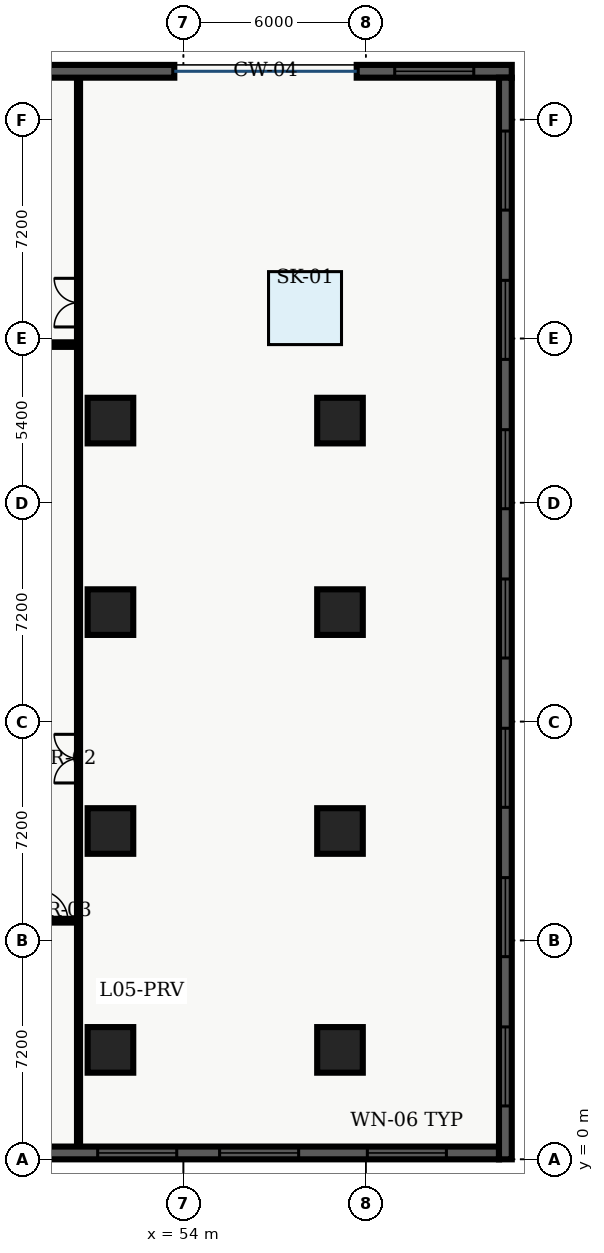
"""IFC4 building model, lengths in metres.
Left out: names, types, materials, properties, quantities, classifications, styles, units other than length and angle.
Written with IfcOpenShell. Run it as: python <this file> out.ifc"""

import sys

from ifc_helpers import new_model, entity, si_unit, converted_unit, direction, frame, origin_with_axes, origin_2d_with_axis, place, context, subcontext, project, spatial, polyline, rectangle, outline, extrude, element, fill, save


model = new_model("IFC4")
c1 = context("Model", 3, precision=1e-05, world=origin_with_axes(), true_north=direction((0.0, 1.0)))
c2 = subcontext(c1, "Body", "Model", "MODEL_VIEW")
j1 = project(units=[si_unit("LENGTHUNIT", "METRE"), converted_unit("PLANEANGLEUNIT", "DEGREE", entity("IfcPlaneAngleMeasure", 0.017), si_unit("PLANEANGLEUNIT", "RADIAN"), dimensions=[0, 0, 0, 0, 0, 0, 0])], contexts=[c1])
p1 = place(None, origin_with_axes())
s1 = spatial("IfcSite", under=j1, at=p1, CompositionType="ELEMENT")
p2 = place(p1, origin_with_axes())
s2 = spatial("IfcBuilding", under=s1, at=p2, CompositionType="ELEMENT")
p3 = place(p2, frame((0.0, 0.0, 24.3), z_axis=(0.0, 0.0, 1.0), x_axis=(1.0, 0.0, 0.0)))
s3 = spatial("IfcBuildingStorey", under=s2, at=p3, CompositionType="ELEMENT", Elevation=24.3)
for number, where, z_axis, x_axis in (
    (1, (51.6, 3.6, 0.0), (0.0, 0.0, 1.0), (1.0, 0.0, 0.0)),
    (2, (51.6, 10.8, 0.0), (0.0, 0.0, 1.0), (1.0, 0.0, 0.0)),
    (3, (51.6, 18.0, 0.0), (0.0, 0.0, 1.0), (1.0, 0.0, 0.0)),
    (4, (51.6, 24.3, 0.0), (0.0, 0.0, 1.0), (1.0, 0.0, 0.0)),
    (5, (59.15, 3.6, 0.0), (0.0, 0.0, 1.0), (1.0, 0.0, 0.0)),
    (6, (59.15, 10.8, 0.0), (0.0, 0.0, 1.0), (1.0, 0.0, 0.0)),
    (7, (59.15, 18.0, 0.0), (0.0, 0.0, 1.0), (1.0, 0.0, 0.0)),
    (8, (59.15, 24.3, 0.0), (0.0, 0.0, 1.0), (1.0, 0.0, 0.0)),
):
    element("IfcColumn", number, at=place(p3, frame(where, z_axis=z_axis, x_axis=x_axis)), inside=s3, PredefinedType="COLUMN", context=c2, shape_type="SweptSolid", body=[
        extrude(rectangle(XDim=1.5, YDim=1.5, at=origin_2d_with_axis()), origin_with_axes(), (0.0, 0.0, 1.0), 4.5),
    ])
p4 = place(p3, frame((50.55, 0.38, 0.0), z_axis=(0.0, 0.0, 1.0), x_axis=(0.0, 1.0, 0.0)))
e9 = element("IfcWall", 9, at=p4, inside=s3, PredefinedType="PARTITIONING", context=c2, shape_type="SweptSolid", body=[
    extrude(outline(polyline([(0.0, -0.05), (35.24, -0.05), (35.24, 0.05), (0.0, 0.05), (0.0, -0.05)])), origin_with_axes(), (0.0, 0.0, 1.0), 3.2),
])
p5 = place(p4, frame((12.8, 0.0, 0.0), z_axis=(0.0, 0.0, 1.0), x_axis=(1.0, 0.0, 0.0)))
e10 = element("IfcOpeningElement", 10, at=p5, cuts=e9, PredefinedType="OPENING", context=c2, shape_type="SweptSolid", body=[
    extrude(rectangle(XDim=1.6, YDim=0.12, at=origin_2d_with_axis()), origin_with_axes(), (0.0, 0.0, 1.0), 2.2),
])
p6 = place(p4, frame((27.8, 0.0, 0.0), z_axis=(0.0, 0.0, 1.0), x_axis=(1.0, 0.0, 0.0)))
e11 = element("IfcOpeningElement", 11, at=p6, cuts=e9, PredefinedType="OPENING", context=c2, shape_type="SweptSolid", body=[
    extrude(rectangle(XDim=1.6, YDim=0.12, at=origin_2d_with_axis()), origin_with_axes(), (0.0, 0.0, 1.0), 2.2),
])
p7 = place(p3, frame((48.05, 7.85, 0.0), z_axis=(0.0, 0.0, 1.0), x_axis=(1.0, 0.0, 0.0)))
e12 = element("IfcWall", 12, at=p7, inside=s3, PredefinedType="PARTITIONING", context=c2, shape_type="SweptSolid", body=[
    extrude(outline(polyline([(0.0, -0.062), (2.5, -0.062), (2.5, 0.062), (0.0, 0.062), (0.0, -0.062)])), origin_with_axes(), (0.0, 0.0, 1.0), 3.2),
])
p8 = place(p7, frame((1.65, 0.0, 0.0), z_axis=(0.0, 0.0, 1.0), x_axis=(1.0, 0.0, 0.0)))
e13 = element("IfcOpeningElement", 13, at=p8, cuts=e12, PredefinedType="OPENING", context=c2, shape_type="SweptSolid", body=[
    extrude(rectangle(XDim=1.0, YDim=0.145, at=origin_2d_with_axis()), origin_with_axes(), (0.0, 0.0, 1.0), 2.15),
])
p9 = place(p3, frame((21.3, 26.8, 0.0), z_axis=(0.0, 0.0, 1.0), x_axis=(1.0, 0.0, 0.0)))
e14 = element("IfcWall", 14, at=p9, inside=s3, PredefinedType="PARTITIONING", context=c2, shape_type="SweptSolid", body=[
    extrude(outline(polyline([(0.0, -0.075), (29.25, -0.075), (29.25, 0.075), (0.0, 0.075), (0.0, -0.075)])), origin_with_axes(), (0.0, 0.0, 1.0), 3.2),
])
p10 = place(p3, frame((64.38, 0.21, 0.0), z_axis=(0.0, 0.0, 1.0), x_axis=(-1.0, 0.0, 0.0)))
e15 = element("IfcWall", 15, at=p10, inside=s3, PredefinedType="SOLIDWALL", context=c2, shape_type="SweptSolid", body=[
    extrude(outline(polyline([(0.0, -0.21), (64.38, -0.21), (64.38, 0.21), (0.0, 0.21), (0.0, -0.21)])), origin_with_axes(), (0.0, 0.0, 1.0), 4.2),
])
p11 = place(p10, frame((3.03, 0.0, 0.45), z_axis=(0.0, 0.0, 1.0), x_axis=(1.0, 0.0, 0.0)))
e16 = element("IfcOpeningElement", 16, at=p11, cuts=e15, PredefinedType="OPENING", context=c2, shape_type="SweptSolid", body=[
    extrude(rectangle(XDim=2.6, YDim=0.44, at=origin_2d_with_axis()), origin_with_axes(), (0.0, 0.0, 1.0), 2.8),
])
p12 = place(p10, frame((7.89, 0.0, 0.45), z_axis=(0.0, 0.0, 1.0), x_axis=(1.0, 0.0, 0.0)))
e17 = element("IfcOpeningElement", 17, at=p12, cuts=e15, PredefinedType="OPENING", context=c2, shape_type="SweptSolid", body=[
    extrude(rectangle(XDim=2.6, YDim=0.44, at=origin_2d_with_axis()), origin_with_axes(), (0.0, 0.0, 1.0), 2.8),
])
p13 = place(p10, frame((11.9, 0.0, 0.45), z_axis=(0.0, 0.0, 1.0), x_axis=(1.0, 0.0, 0.0)))
e18 = element("IfcOpeningElement", 18, at=p13, cuts=e15, PredefinedType="OPENING", context=c2, shape_type="SweptSolid", body=[
    extrude(rectangle(XDim=2.6, YDim=0.44, at=origin_2d_with_axis()), origin_with_axes(), (0.0, 0.0, 1.0), 2.8),
])
p14 = place(p10, frame((17.61, 0.0, 0.45), z_axis=(0.0, 0.0, 1.0), x_axis=(1.0, 0.0, 0.0)))
e19 = element("IfcOpeningElement", 19, at=p14, cuts=e15, PredefinedType="OPENING", context=c2, shape_type="SweptSolid", body=[
    extrude(rectangle(XDim=2.6, YDim=0.44, at=origin_2d_with_axis()), origin_with_axes(), (0.0, 0.0, 1.0), 2.8),
])
p15 = place(p10, frame((22.47, 0.0, 0.45), z_axis=(0.0, 0.0, 1.0), x_axis=(1.0, 0.0, 0.0)))
e20 = element("IfcOpeningElement", 20, at=p15, cuts=e15, PredefinedType="OPENING", context=c2, shape_type="SweptSolid", body=[
    extrude(rectangle(XDim=2.6, YDim=0.44, at=origin_2d_with_axis()), origin_with_axes(), (0.0, 0.0, 1.0), 2.8),
])
p16 = place(p10, frame((27.33, 0.0, 0.45), z_axis=(0.0, 0.0, 1.0), x_axis=(1.0, 0.0, 0.0)))
e21 = element("IfcOpeningElement", 21, at=p16, cuts=e15, PredefinedType="OPENING", context=c2, shape_type="SweptSolid", body=[
    extrude(rectangle(XDim=2.6, YDim=0.44, at=origin_2d_with_axis()), origin_with_axes(), (0.0, 0.0, 1.0), 2.8),
])
p17 = place(p10, frame((32.19, 0.0, 0.45), z_axis=(0.0, 0.0, 1.0), x_axis=(1.0, 0.0, 0.0)))
e22 = element("IfcOpeningElement", 22, at=p17, cuts=e15, PredefinedType="OPENING", context=c2, shape_type="SweptSolid", body=[
    extrude(rectangle(XDim=2.6, YDim=0.44, at=origin_2d_with_axis()), origin_with_axes(), (0.0, 0.0, 1.0), 2.8),
])
p18 = place(p10, frame((37.05, 0.0, 0.45), z_axis=(0.0, 0.0, 1.0), x_axis=(1.0, 0.0, 0.0)))
e23 = element("IfcOpeningElement", 23, at=p18, cuts=e15, PredefinedType="OPENING", context=c2, shape_type="SweptSolid", body=[
    extrude(rectangle(XDim=2.6, YDim=0.44, at=origin_2d_with_axis()), origin_with_axes(), (0.0, 0.0, 1.0), 2.8),
])
p19 = place(p10, frame((41.06, 0.0, 0.45), z_axis=(0.0, 0.0, 1.0), x_axis=(1.0, 0.0, 0.0)))
e24 = element("IfcOpeningElement", 24, at=p19, cuts=e15, PredefinedType="OPENING", context=c2, shape_type="SweptSolid", body=[
    extrude(rectangle(XDim=2.6, YDim=0.44, at=origin_2d_with_axis()), origin_with_axes(), (0.0, 0.0, 1.0), 2.8),
])
p20 = place(p10, frame((46.77, 0.0, 0.45), z_axis=(0.0, 0.0, 1.0), x_axis=(1.0, 0.0, 0.0)))
e25 = element("IfcOpeningElement", 25, at=p20, cuts=e15, PredefinedType="OPENING", context=c2, shape_type="SweptSolid", body=[
    extrude(rectangle(XDim=2.6, YDim=0.44, at=origin_2d_with_axis()), origin_with_axes(), (0.0, 0.0, 1.0), 2.8),
])
p21 = place(p10, frame((50.78, 0.0, 0.45), z_axis=(0.0, 0.0, 1.0), x_axis=(1.0, 0.0, 0.0)))
e26 = element("IfcOpeningElement", 26, at=p21, cuts=e15, PredefinedType="OPENING", context=c2, shape_type="SweptSolid", body=[
    extrude(rectangle(XDim=2.6, YDim=0.44, at=origin_2d_with_axis()), origin_with_axes(), (0.0, 0.0, 1.0), 2.8),
])
p22 = place(p10, frame((56.49, 0.0, 0.45), z_axis=(0.0, 0.0, 1.0), x_axis=(1.0, 0.0, 0.0)))
e27 = element("IfcOpeningElement", 27, at=p22, cuts=e15, PredefinedType="OPENING", context=c2, shape_type="SweptSolid", body=[
    extrude(rectangle(XDim=2.6, YDim=0.44, at=origin_2d_with_axis()), origin_with_axes(), (0.0, 0.0, 1.0), 2.8),
])
p23 = place(p10, frame((61.35, 0.0, 0.45), z_axis=(0.0, 0.0, 1.0), x_axis=(1.0, 0.0, 0.0)))
e28 = element("IfcOpeningElement", 28, at=p23, cuts=e15, PredefinedType="OPENING", context=c2, shape_type="SweptSolid", body=[
    extrude(rectangle(XDim=2.6, YDim=0.44, at=origin_2d_with_axis()), origin_with_axes(), (0.0, 0.0, 1.0), 2.8),
])
p24 = place(p3, frame((48.18, 35.79, 0.0), z_axis=(0.0, 0.0, 1.0), x_axis=(1.0, 0.0, 0.0)))
e29 = element("IfcWall", 29, at=p24, inside=s3, PredefinedType="SOLIDWALL", context=c2, shape_type="SweptSolid", body=[
    extrude(outline(polyline([(0.0, -0.21), (5.52, -0.21), (5.52, 0.21), (0.0, 0.21), (0.0, -0.21)])), origin_with_axes(), (0.0, 0.0, 1.0), 4.2),
])
p25 = place(p3, frame((59.7, 35.79, 0.0), z_axis=(0.0, 0.0, 1.0), x_axis=(1.0, 0.0, 0.0)))
e30 = element("IfcWall", 30, at=p25, inside=s3, PredefinedType="SOLIDWALL", context=c2, shape_type="SweptSolid", body=[
    extrude(outline(polyline([(0.0, -0.21), (5.1, -0.21), (5.1, 0.21), (0.0, 0.21), (0.0, -0.21)])), origin_with_axes(), (0.0, 0.0, 1.0), 4.2),
])
p26 = place(p25, frame((2.55, 0.0, 0.45), z_axis=(0.0, 0.0, 1.0), x_axis=(1.0, 0.0, 0.0)))
e31 = element("IfcOpeningElement", 31, at=p26, cuts=e30, PredefinedType="OPENING", context=c2, shape_type="SweptSolid", body=[
    extrude(rectangle(XDim=2.6, YDim=0.44, at=origin_2d_with_axis()), origin_with_axes(), (0.0, 0.0, 1.0), 2.8),
])
p27 = place(p3, frame((64.59, 35.58, 0.0), z_axis=(0.0, 0.0, 1.0), x_axis=(0.0, -1.0, 0.0)))
e32 = element("IfcWall", 32, at=p27, inside=s3, PredefinedType="SOLIDWALL", context=c2, shape_type="SweptSolid", body=[
    extrude(outline(polyline([(0.0, -0.21), (35.58, -0.21), (35.58, 0.21), (0.0, 0.21), (0.0, -0.21)])), origin_with_axes(), (0.0, 0.0, 1.0), 4.2),
])
p28 = place(p27, frame((3.056, 0.0, 0.45), z_axis=(0.0, 0.0, 1.0), x_axis=(1.0, 0.0, 0.0)))
e33 = element("IfcOpeningElement", 33, at=p28, cuts=e32, PredefinedType="OPENING", context=c2, shape_type="SweptSolid", body=[
    extrude(rectangle(XDim=2.6, YDim=0.44, at=origin_2d_with_axis()), origin_with_axes(), (0.0, 0.0, 1.0), 2.8),
])
p29 = place(p27, frame((7.967, 0.0, 0.45), z_axis=(0.0, 0.0, 1.0), x_axis=(1.0, 0.0, 0.0)))
e34 = element("IfcOpeningElement", 34, at=p29, cuts=e32, PredefinedType="OPENING", context=c2, shape_type="SweptSolid", body=[
    extrude(rectangle(XDim=2.6, YDim=0.44, at=origin_2d_with_axis()), origin_with_axes(), (0.0, 0.0, 1.0), 2.8),
])
p30 = place(p27, frame((12.879, 0.0, 0.45), z_axis=(0.0, 0.0, 1.0), x_axis=(1.0, 0.0, 0.0)))
e35 = element("IfcOpeningElement", 35, at=p30, cuts=e32, PredefinedType="OPENING", context=c2, shape_type="SweptSolid", body=[
    extrude(rectangle(XDim=2.6, YDim=0.44, at=origin_2d_with_axis()), origin_with_axes(), (0.0, 0.0, 1.0), 2.8),
])
p31 = place(p27, frame((17.79, 0.0, 0.45), z_axis=(0.0, 0.0, 1.0), x_axis=(1.0, 0.0, 0.0)))
e36 = element("IfcOpeningElement", 36, at=p31, cuts=e32, PredefinedType="OPENING", context=c2, shape_type="SweptSolid", body=[
    extrude(rectangle(XDim=2.6, YDim=0.44, at=origin_2d_with_axis()), origin_with_axes(), (0.0, 0.0, 1.0), 2.8),
])
p32 = place(p27, frame((22.701, 0.0, 0.45), z_axis=(0.0, 0.0, 1.0), x_axis=(1.0, 0.0, 0.0)))
e37 = element("IfcOpeningElement", 37, at=p32, cuts=e32, PredefinedType="OPENING", context=c2, shape_type="SweptSolid", body=[
    extrude(rectangle(XDim=2.6, YDim=0.44, at=origin_2d_with_axis()), origin_with_axes(), (0.0, 0.0, 1.0), 2.8),
])
p33 = place(p27, frame((27.613, 0.0, 0.45), z_axis=(0.0, 0.0, 1.0), x_axis=(1.0, 0.0, 0.0)))
e38 = element("IfcOpeningElement", 38, at=p33, cuts=e32, PredefinedType="OPENING", context=c2, shape_type="SweptSolid", body=[
    extrude(rectangle(XDim=2.6, YDim=0.44, at=origin_2d_with_axis()), origin_with_axes(), (0.0, 0.0, 1.0), 2.8),
])
p34 = place(p27, frame((32.524, 0.0, 0.45), z_axis=(0.0, 0.0, 1.0), x_axis=(1.0, 0.0, 0.0)))
e39 = element("IfcOpeningElement", 39, at=p34, cuts=e32, PredefinedType="OPENING", context=c2, shape_type="SweptSolid", body=[
    extrude(rectangle(XDim=2.6, YDim=0.44, at=origin_2d_with_axis()), origin_with_axes(), (0.0, 0.0, 1.0), 2.8),
])
p35 = place(p7, frame((1.65, 0.0, 0.0), z_axis=(0.0, 0.0, 1.0), x_axis=(1.0, 0.0, 0.0)))
e40 = element("IfcDoor", 40, at=p35, inside=s3, OperationType="SINGLE_SWING_LEFT", PredefinedType="DOOR", context=c2, shape_type="SweptSolid", body=[
    extrude(rectangle(XDim=1.0, YDim=0.075, at=origin_2d_with_axis()), origin_with_axes(), (0.0, 0.0, 1.0), 2.15),
])
fill(e13, e40)
p36 = place(p4, frame((12.8, 0.0, 0.0), z_axis=(0.0, 0.0, 1.0), x_axis=(1.0, 0.0, 0.0)))
e41 = element("IfcDoor", 41, at=p36, inside=s3, OperationType="DOUBLE_DOOR_SINGLE_SWING", PredefinedType="DOOR", context=c2, shape_type="SweptSolid", body=[
    extrude(rectangle(XDim=1.6, YDim=0.06, at=origin_2d_with_axis()), origin_with_axes(), (0.0, 0.0, 1.0), 2.2),
])
fill(e10, e41)
p37 = place(p4, frame((27.8, 0.0, 0.0), z_axis=(0.0, 0.0, 1.0), x_axis=(1.0, 0.0, 0.0)))
e42 = element("IfcDoor", 42, at=p37, inside=s3, OperationType="DOUBLE_DOOR_SINGLE_SWING", PredefinedType="DOOR", context=c2, shape_type="SweptSolid", body=[
    extrude(rectangle(XDim=1.6, YDim=0.06, at=origin_2d_with_axis()), origin_with_axes(), (0.0, 0.0, 1.0), 2.2),
])
fill(e11, e42)
p38 = place(p3, frame((58.0, 28.0, -0.05), z_axis=(0.0, 0.0, 1.0), x_axis=(1.0, 0.0, 0.0)))
e43 = element("IfcWindow", 43, at=p38, inside=s3, PredefinedType="SKYLIGHT", context=c2, shape_type="SweptSolid", body=[
    extrude(rectangle(XDim=2.4, YDim=2.4, at=origin_2d_with_axis()), origin_with_axes(), (0.0, 0.0, 1.0), 0.05),
])
p39 = place(p10, frame((3.03, 0.0, 0.45), z_axis=(0.0, 0.0, 1.0), x_axis=(1.0, 0.0, 0.0)))
e44 = element("IfcWindow", 44, at=p39, inside=s3, PredefinedType="WINDOW", context=c2, shape_type="SweptSolid", body=[
    extrude(rectangle(XDim=2.6, YDim=0.09, at=origin_2d_with_axis()), origin_with_axes(), (0.0, 0.0, 1.0), 2.8),
])
fill(e16, e44)
p40 = place(p10, frame((7.89, 0.0, 0.45), z_axis=(0.0, 0.0, 1.0), x_axis=(1.0, 0.0, 0.0)))
e45 = element("IfcWindow", 45, at=p40, inside=s3, PredefinedType="WINDOW", context=c2, shape_type="SweptSolid", body=[
    extrude(rectangle(XDim=2.6, YDim=0.09, at=origin_2d_with_axis()), origin_with_axes(), (0.0, 0.0, 1.0), 2.8),
])
fill(e17, e45)
p41 = place(p10, frame((11.9, 0.0, 0.45), z_axis=(0.0, 0.0, 1.0), x_axis=(1.0, 0.0, 0.0)))
e46 = element("IfcWindow", 46, at=p41, inside=s3, PredefinedType="WINDOW", context=c2, shape_type="SweptSolid", body=[
    extrude(rectangle(XDim=2.6, YDim=0.09, at=origin_2d_with_axis()), origin_with_axes(), (0.0, 0.0, 1.0), 2.8),
])
fill(e18, e46)
p42 = place(p25, frame((2.55, 0.0, 0.45), z_axis=(0.0, 0.0, 1.0), x_axis=(1.0, 0.0, 0.0)))
e47 = element("IfcWindow", 47, at=p42, inside=s3, PredefinedType="WINDOW", context=c2, shape_type="SweptSolid", body=[
    extrude(rectangle(XDim=2.6, YDim=0.09, at=origin_2d_with_axis()), origin_with_axes(), (0.0, 0.0, 1.0), 2.8),
])
fill(e31, e47)
p43 = place(p27, frame((3.056, 0.0, 0.45), z_axis=(0.0, 0.0, 1.0), x_axis=(1.0, 0.0, 0.0)))
e48 = element("IfcWindow", 48, at=p43, inside=s3, PredefinedType="WINDOW", context=c2, shape_type="SweptSolid", body=[
    extrude(rectangle(XDim=2.6, YDim=0.09, at=origin_2d_with_axis()), origin_with_axes(), (0.0, 0.0, 1.0), 2.8),
])
fill(e33, e48)
p44 = place(p27, frame((7.967, 0.0, 0.45), z_axis=(0.0, 0.0, 1.0), x_axis=(1.0, 0.0, 0.0)))
e49 = element("IfcWindow", 49, at=p44, inside=s3, PredefinedType="WINDOW", context=c2, shape_type="SweptSolid", body=[
    extrude(rectangle(XDim=2.6, YDim=0.09, at=origin_2d_with_axis()), origin_with_axes(), (0.0, 0.0, 1.0), 2.8),
])
fill(e34, e49)
p45 = place(p27, frame((12.879, 0.0, 0.45), z_axis=(0.0, 0.0, 1.0), x_axis=(1.0, 0.0, 0.0)))
e50 = element("IfcWindow", 50, at=p45, inside=s3, PredefinedType="WINDOW", context=c2, shape_type="SweptSolid", body=[
    extrude(rectangle(XDim=2.6, YDim=0.09, at=origin_2d_with_axis()), origin_with_axes(), (0.0, 0.0, 1.0), 2.8),
])
fill(e35, e50)
p46 = place(p27, frame((17.79, 0.0, 0.45), z_axis=(0.0, 0.0, 1.0), x_axis=(1.0, 0.0, 0.0)))
e51 = element("IfcWindow", 51, at=p46, inside=s3, PredefinedType="WINDOW", context=c2, shape_type="SweptSolid", body=[
    extrude(rectangle(XDim=2.6, YDim=0.09, at=origin_2d_with_axis()), origin_with_axes(), (0.0, 0.0, 1.0), 2.8),
])
fill(e36, e51)
p47 = place(p27, frame((22.701, 0.0, 0.45), z_axis=(0.0, 0.0, 1.0), x_axis=(1.0, 0.0, 0.0)))
e52 = element("IfcWindow", 52, at=p47, inside=s3, PredefinedType="WINDOW", context=c2, shape_type="SweptSolid", body=[
    extrude(rectangle(XDim=2.6, YDim=0.09, at=origin_2d_with_axis()), origin_with_axes(), (0.0, 0.0, 1.0), 2.8),
])
fill(e37, e52)
p48 = place(p27, frame((27.613, 0.0, 0.45), z_axis=(0.0, 0.0, 1.0), x_axis=(1.0, 0.0, 0.0)))
e53 = element("IfcWindow", 53, at=p48, inside=s3, PredefinedType="WINDOW", context=c2, shape_type="SweptSolid", body=[
    extrude(rectangle(XDim=2.6, YDim=0.09, at=origin_2d_with_axis()), origin_with_axes(), (0.0, 0.0, 1.0), 2.8),
])
fill(e38, e53)
p49 = place(p27, frame((32.524, 0.0, 0.45), z_axis=(0.0, 0.0, 1.0), x_axis=(1.0, 0.0, 0.0)))
e54 = element("IfcWindow", 54, at=p49, inside=s3, PredefinedType="WINDOW", context=c2, shape_type="SweptSolid", body=[
    extrude(rectangle(XDim=2.6, YDim=0.09, at=origin_2d_with_axis()), origin_with_axes(), (0.0, 0.0, 1.0), 2.8),
])
fill(e39, e54)
save(model, sys.argv[1])
